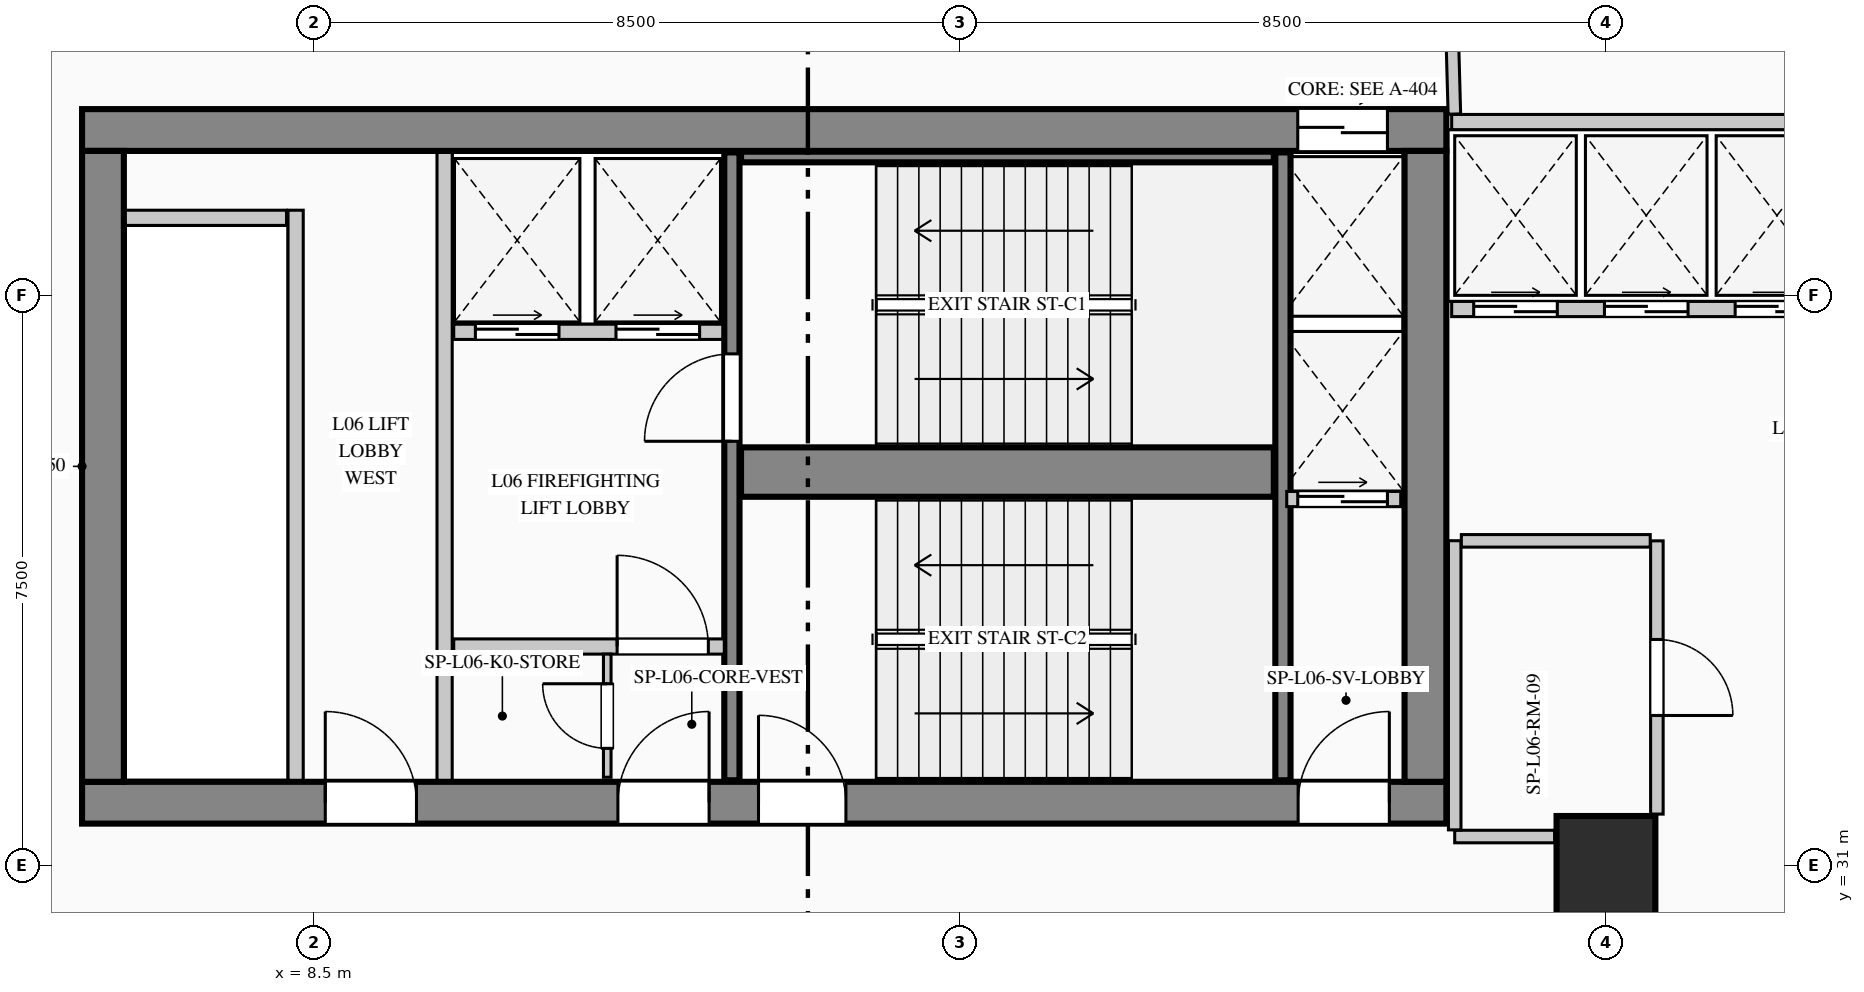
"""IFC4 building model, lengths in metres.
Left out: names, types, materials, properties, quantities, classifications, styles, units other than length and angle.
Written with IfcOpenShell. Run it as: python <this file> out.ifc"""

import sys

from ifc_helpers import new_model, si_unit, direction, frame, frame_2d, origin, origin_2d, place, context, subcontext, project, spatial, rectangle, extrude, element, fill, save


model = new_model("IFC4")
c1 = context("Model", 3, precision=1e-05, world=origin(), true_north=direction((0.0, 1.0)))
c2 = subcontext(c1, "Body", "Model", "MODEL_VIEW")
j1 = project(units=[si_unit("LENGTHUNIT", "METRE"), si_unit("PLANEANGLEUNIT", "RADIAN")], contexts=[c1])
p1 = place(None, origin())
s1 = spatial("IfcSite", under=j1, at=p1, CompositionType="ELEMENT")
p2 = place(p1, origin())
s2 = spatial("IfcBuilding", under=s1, at=p2, CompositionType="ELEMENT")
p3 = place(p2, frame((0.0, 0.0, 27.0)))
s3 = spatial("IfcBuildingStorey", under=s2, at=p3, CompositionType="ELEMENT", Elevation=27.0)
p4 = place(p3, frame((5.45, 40.675, 0.0), z_axis=(0.0, 0.0, 1.0), x_axis=(1.0, 0.0, 0.0)))
e1 = element("IfcWall", 1, at=p4, inside=s3, PredefinedType="SHEAR", context=c2, shape_type="SweptSolid", body=[
    extrude(rectangle(XDim=17.95, YDim=0.55, at=frame_2d((8.975, 0.0))), origin(), (0.0, 0.0, 1.0), 4.4),
])
p5 = place(p4, frame((15.995, 0.0, 0.0)))
e2 = element("IfcOpeningElement", 2, at=p5, cuts=e1, PredefinedType="OPENING", context=c2, shape_type="SweptSolid", body=[
    extrude(rectangle(XDim=1.18, YDim=2.25, at=frame_2d((0.59, 1.125))), frame((0.0, 0.285, 0.0), z_axis=(0.0, -1.0, 0.0), x_axis=(1.0, 0.0, 0.0)), (0.0, 0.0, 1.0), 0.57),
])
p6 = place(p3, frame((5.45, 31.825, 0.0), z_axis=(0.0, 0.0, 1.0), x_axis=(1.0, 0.0, 0.0)))
e3 = element("IfcWall", 3, at=p6, inside=s3, PredefinedType="SHEAR", context=c2, shape_type="SweptSolid", body=[
    extrude(rectangle(XDim=17.95, YDim=0.55, at=frame_2d((8.975, 0.0))), origin(), (0.0, 0.0, 1.0), 4.4),
])
p7 = place(p6, frame((3.2, 0.0, 0.0)))
e4 = element("IfcOpeningElement", 4, at=p7, cuts=e3, PredefinedType="OPENING", context=c2, shape_type="SweptSolid", body=[
    extrude(rectangle(XDim=1.2, YDim=2.2, at=frame_2d((0.6, 1.1))), frame((0.0, 0.285, 0.0), z_axis=(0.0, -1.0, 0.0), x_axis=(1.0, 0.0, 0.0)), (0.0, 0.0, 1.0), 0.57),
])
p8 = place(p6, frame((7.05, 0.0, 0.0)))
e5 = element("IfcOpeningElement", 5, at=p8, cuts=e3, PredefinedType="OPENING", context=c2, shape_type="SweptSolid", body=[
    extrude(rectangle(XDim=1.2, YDim=2.2, at=frame_2d((0.6, 1.1))), frame((0.0, 0.285, 0.0), z_axis=(0.0, -1.0, 0.0), x_axis=(1.0, 0.0, 0.0)), (0.0, 0.0, 1.0), 0.57),
])
p9 = place(p6, frame((8.9, 0.0, 0.0)))
e6 = element("IfcOpeningElement", 6, at=p9, cuts=e3, PredefinedType="OPENING", context=c2, shape_type="SweptSolid", body=[
    extrude(rectangle(XDim=1.15, YDim=2.2, at=frame_2d((0.575, 1.1))), frame((0.0, 0.285, 0.0), z_axis=(0.0, -1.0, 0.0), x_axis=(1.0, 0.0, 0.0)), (0.0, 0.0, 1.0), 0.57),
])
p10 = place(p6, frame((16.0, 0.0, 0.0)))
e7 = element("IfcOpeningElement", 7, at=p10, cuts=e3, PredefinedType="OPENING", context=c2, shape_type="SweptSolid", body=[
    extrude(rectangle(XDim=1.2, YDim=2.2, at=frame_2d((0.6, 1.1))), frame((0.0, 0.285, 0.0), z_axis=(0.0, -1.0, 0.0), x_axis=(1.0, 0.0, 0.0)), (0.0, 0.0, 1.0), 0.57),
])
for number, where, z_axis, x_axis in (
    (8, (5.725, 32.1, 0.0), (0.0, 0.0, 1.0), (0.0, 1.0, 0.0)),
    (9, (23.125, 32.1, 0.0), (0.0, 0.0, 1.0), (0.0, 1.0, 0.0)),
):
    element("IfcWall", number, at=place(p3, frame(where, z_axis=z_axis, x_axis=x_axis)), inside=s3, PredefinedType="SHEAR", context=c2, shape_type="SweptSolid", body=[
        extrude(rectangle(XDim=8.3, YDim=0.55, at=frame_2d((4.15, 0.0))), origin(), (0.0, 0.0, 1.0), 4.4),
    ])
p11 = place(p3, frame((14.0, 32.12, 0.0), z_axis=(0.0, 0.0, 1.0), x_axis=(0.0, 1.0, 0.0)))
e10 = element("IfcWall", 10, at=p11, inside=s3, PredefinedType="SHEAR", context=c2, shape_type="SweptSolid", body=[
    extrude(rectangle(XDim=8.26, YDim=0.2, at=frame_2d((4.13, 0.0))), origin(), (0.0, 0.0, 1.0), 4.4),
])
p12 = place(p11, frame((4.46, 0.0, 0.0)))
e11 = element("IfcOpeningElement", 11, at=p12, cuts=e10, PredefinedType="OPENING", context=c2, shape_type="SweptSolid", body=[
    extrude(rectangle(XDim=1.15, YDim=2.2, at=frame_2d((0.575, 1.1))), frame((0.0, 0.11, 0.0), z_axis=(0.0, -1.0, 0.0), x_axis=(1.0, 0.0, 0.0)), (0.0, 0.0, 1.0), 0.22),
])
p13 = place(p3, frame((14.12, 36.175, 0.0), z_axis=(0.0, 0.0, 1.0), x_axis=(1.0, 0.0, 0.0)))
e12 = element("IfcWall", 12, at=p13, inside=s3, PredefinedType="SHEAR", context=c2, shape_type="SweptSolid", body=[
    extrude(rectangle(XDim=7.01, YDim=0.65, at=frame_2d((3.505, 0.0))), origin(), (0.0, 0.0, 1.0), 4.4),
])
p14 = place(p3, frame((21.25, 32.12, 0.0), z_axis=(0.0, 0.0, 1.0), x_axis=(0.0, 1.0, 0.0)))
e13 = element("IfcWall", 13, at=p14, inside=s3, PredefinedType="SHEAR", context=c2, shape_type="SweptSolid", body=[
    extrude(rectangle(XDim=8.26, YDim=0.2, at=frame_2d((4.13, 0.0))), origin(), (0.0, 0.0, 1.0), 4.4),
])
p15 = place(p3, frame((14.12, 40.32, 0.0), z_axis=(0.0, 0.0, 1.0), x_axis=(1.0, 0.0, 0.0)))
e14 = element("IfcWall", 14, at=p15, inside=s3, PredefinedType="SHEAR", context=c2, shape_type="SweptSolid", body=[
    extrude(rectangle(XDim=7.01, YDim=0.14, at=frame_2d((3.505, 0.0))), origin(), (0.0, 0.0, 1.0), 4.4),
])
p16 = place(p3, frame((25.5, 31.0, 0.0), z_axis=(0.0, 0.0, 1.0), x_axis=(1.0, 0.0, 0.0)))
e15 = element("IfcColumn", 15, at=p16, inside=s3, PredefinedType="COLUMN", context=c2, shape_type="SweptSolid", body=[
    extrude(rectangle(XDim=1.3, YDim=1.3, at=origin_2d()), origin(), (0.0, 0.0, 1.0), 4.4),
])
p17 = place(p3, frame((8.523, 4.84, 0.0), z_axis=(0.0, 0.0, 1.0), x_axis=(-0.150394554312, 0.988626055712, 0.0)))
e16 = element("IfcWall", 16, at=p17, inside=s3, PredefinedType="STANDARD", context=c2, shape_type="SweptSolid", body=[
    extrude(rectangle(XDim=36.738, YDim=0.28, at=frame_2d((18.369, 0.0))), origin(), (0.0, 0.0, 1.0), 4.1),
])
p18 = place(p17, frame((22.762, 0.0, 0.9)))
e17 = element("IfcOpeningElement", 17, at=p18, cuts=e16, PredefinedType="OPENING", context=c2, shape_type="SweptSolid", body=[
    extrude(rectangle(XDim=1.5, YDim=1.8, at=frame_2d((0.75, 0.9))), frame((0.0, 0.15, 0.0), z_axis=(0.0, -1.0, 0.0), x_axis=(1.0, 0.0, 0.0)), (0.0, 0.0, 1.0), 0.3),
])
p19 = place(p3, frame((8.26, 32.12, 0.0), z_axis=(0.0, 0.0, 1.0), x_axis=(0.0, 1.0, 0.0)))
e18 = element("IfcWall", 18, at=p19, inside=s3, PredefinedType="PARTITIONING", context=c2, shape_type="SweptSolid", body=[
    extrude(rectangle(XDim=7.5, YDim=0.2, at=frame_2d((3.75, 0.0))), origin(), (0.0, 0.0, 1.0), 4.1),
])
p20 = place(p3, frame((6.02, 39.52, 0.0), z_axis=(0.0, 0.0, 1.0), x_axis=(1.0, 0.0, 0.0)))
e19 = element("IfcWall", 19, at=p20, inside=s3, PredefinedType="PARTITIONING", context=c2, shape_type="SweptSolid", body=[
    extrude(rectangle(XDim=2.12, YDim=0.2, at=frame_2d((1.06, 0.0))), origin(), (0.0, 0.0, 1.0), 4.1),
])
p21 = place(p3, frame((10.22, 32.12, 0.0), z_axis=(0.0, 0.0, 1.0), x_axis=(0.0, 1.0, 0.0)))
e20 = element("IfcWall", 20, at=p21, inside=s3, PredefinedType="PARTITIONING", context=c2, shape_type="SweptSolid", body=[
    extrude(rectangle(XDim=8.26, YDim=0.2, at=frame_2d((4.13, 0.0))), origin(), (0.0, 0.0, 1.0), 4.1),
])
p22 = place(p3, frame((10.34, 38.02, 0.0), z_axis=(0.0, 0.0, 1.0), x_axis=(1.0, 0.0, 0.0)))
e21 = element("IfcWall", 21, at=p22, inside=s3, PredefinedType="PARTITIONING", context=c2, shape_type="SweptSolid", body=[
    extrude(rectangle(XDim=3.54, YDim=0.2, at=frame_2d((1.77, 0.0))), origin(), (0.0, 0.0, 1.0), 4.1),
])
p23 = place(p22, frame((0.285, 0.0, 0.0)))
e22 = element("IfcOpeningElement", 22, at=p23, cuts=e21, PredefinedType="OPENING", context=c2, shape_type="SweptSolid", body=[
    extrude(rectangle(XDim=1.1, YDim=2.2, at=frame_2d((0.55, 1.1))), frame((0.0, 0.11, 0.0), z_axis=(0.0, -1.0, 0.0), x_axis=(1.0, 0.0, 0.0)), (0.0, 0.0, 1.0), 0.22),
])
p24 = place(p22, frame((2.135, 0.0, 0.0)))
e23 = element("IfcOpeningElement", 23, at=p24, cuts=e21, PredefinedType="OPENING", context=c2, shape_type="SweptSolid", body=[
    extrude(rectangle(XDim=1.1, YDim=2.2, at=frame_2d((0.55, 1.1))), frame((0.0, 0.11, 0.0), z_axis=(0.0, -1.0, 0.0), x_axis=(1.0, 0.0, 0.0)), (0.0, 0.0, 1.0), 0.22),
])
p25 = place(p3, frame((10.34, 33.88, 0.0), z_axis=(0.0, 0.0, 1.0), x_axis=(1.0, 0.0, 0.0)))
e24 = element("IfcWall", 24, at=p25, inside=s3, PredefinedType="PARTITIONING", context=c2, shape_type="SweptSolid", body=[
    extrude(rectangle(XDim=3.56, YDim=0.2, at=frame_2d((1.78, 0.0))), origin(), (0.0, 0.0, 1.0), 4.1),
])
p26 = place(p25, frame((2.15, 0.0, 0.0)))
e25 = element("IfcOpeningElement", 25, at=p26, cuts=e24, PredefinedType="OPENING", context=c2, shape_type="SweptSolid", body=[
    extrude(rectangle(XDim=1.2, YDim=2.2, at=frame_2d((0.6, 1.1))), frame((0.0, 0.11, 0.0), z_axis=(0.0, -1.0, 0.0), x_axis=(1.0, 0.0, 0.0)), (0.0, 0.0, 1.0), 0.22),
])
p27 = place(p3, frame((12.36, 32.16, 0.0), z_axis=(0.0, 0.0, 1.0), x_axis=(0.0, 1.0, 0.0)))
e26 = element("IfcWall", 26, at=p27, inside=s3, PredefinedType="PARTITIONING", context=c2, shape_type="SweptSolid", body=[
    extrude(rectangle(XDim=1.62, YDim=0.1, at=frame_2d((0.81, 0.0))), origin(), (0.0, 0.0, 1.0), 4.1),
])
p28 = place(p27, frame((0.38, 0.0, 0.0)))
e27 = element("IfcOpeningElement", 27, at=p28, cuts=e26, PredefinedType="OPENING", context=c2, shape_type="SweptSolid", body=[
    extrude(rectangle(XDim=0.85, YDim=2.1, at=frame_2d((0.425, 1.05))), frame((0.0, 0.06, 0.0), z_axis=(0.0, -1.0, 0.0), x_axis=(1.0, 0.0, 0.0)), (0.0, 0.0, 1.0), 0.12),
])
p29 = place(p3, frame((21.3, 35.82, 0.0), z_axis=(0.0, 0.0, 1.0), x_axis=(1.0, 0.0, 0.0)))
e28 = element("IfcWall", 28, at=p29, inside=s3, PredefinedType="PARTITIONING", context=c2, shape_type="SweptSolid", body=[
    extrude(rectangle(XDim=1.5, YDim=0.2, at=frame_2d((0.75, 0.0))), origin(), (0.0, 0.0, 1.0), 4.1),
])
p30 = place(p29, frame((0.145, 0.0, 0.0)))
e29 = element("IfcOpeningElement", 29, at=p30, cuts=e28, PredefinedType="OPENING", context=c2, shape_type="SweptSolid", body=[
    extrude(rectangle(XDim=1.18, YDim=2.25, at=frame_2d((0.59, 1.125))), frame((0.0, 0.11, 0.0), z_axis=(0.0, -1.0, 0.0), x_axis=(1.0, 0.0, 0.0)), (0.0, 0.0, 1.0), 0.22),
])
p31 = place(p3, frame((23.47, 40.78, 0.0), z_axis=(0.0, 0.0, 1.0), x_axis=(1.0, 0.0, 0.0)))
e30 = element("IfcWall", 30, at=p31, inside=s3, PredefinedType="PARTITIONING", context=c2, shape_type="SweptSolid", body=[
    extrude(rectangle(XDim=6.91, YDim=0.2, at=frame_2d((3.455, 0.0))), origin(), (0.0, 0.0, 1.0), 4.1),
])
p32 = place(p3, frame((23.47, 38.32, 0.0), z_axis=(0.0, 0.0, 1.0), x_axis=(1.0, 0.0, 0.0)))
e31 = element("IfcWall", 31, at=p32, inside=s3, PredefinedType="PARTITIONING", context=c2, shape_type="SweptSolid", body=[
    extrude(rectangle(XDim=6.79, YDim=0.2, at=frame_2d((3.395, 0.0))), origin(), (0.0, 0.0, 1.0), 4.1),
])
p33 = place(p32, frame((0.29, 0.0, 0.0)))
e32 = element("IfcOpeningElement", 32, at=p33, cuts=e31, PredefinedType="OPENING", context=c2, shape_type="SweptSolid", body=[
    extrude(rectangle(XDim=1.1, YDim=2.2, at=frame_2d((0.55, 1.1))), frame((0.0, 0.11, 0.0), z_axis=(0.0, -1.0, 0.0), x_axis=(1.0, 0.0, 0.0)), (0.0, 0.0, 1.0), 0.22),
])
p34 = place(p32, frame((2.01, 0.0, 0.0)))
e33 = element("IfcOpeningElement", 33, at=p34, cuts=e31, PredefinedType="OPENING", context=c2, shape_type="SweptSolid", body=[
    extrude(rectangle(XDim=1.1, YDim=2.2, at=frame_2d((0.55, 1.1))), frame((0.0, 0.11, 0.0), z_axis=(0.0, -1.0, 0.0), x_axis=(1.0, 0.0, 0.0)), (0.0, 0.0, 1.0), 0.22),
])
p35 = place(p32, frame((3.73, 0.0, 0.0)))
e34 = element("IfcOpeningElement", 34, at=p35, cuts=e31, PredefinedType="OPENING", context=c2, shape_type="SweptSolid", body=[
    extrude(rectangle(XDim=1.1, YDim=2.2, at=frame_2d((0.55, 1.1))), frame((0.0, 0.11, 0.0), z_axis=(0.0, -1.0, 0.0), x_axis=(1.0, 0.0, 0.0)), (0.0, 0.0, 1.0), 0.22),
])
p36 = place(p32, frame((5.45, 0.0, 0.0)))
e35 = element("IfcOpeningElement", 35, at=p36, cuts=e31, PredefinedType="OPENING", context=c2, shape_type="SweptSolid", body=[
    extrude(rectangle(XDim=1.1, YDim=2.2, at=frame_2d((0.55, 1.1))), frame((0.0, 0.11, 0.0), z_axis=(0.0, -1.0, 0.0), x_axis=(1.0, 0.0, 0.0)), (0.0, 0.0, 1.0), 0.22),
])
p37 = place(p3, frame((26.17, 35.27, 0.0), z_axis=(0.0, 0.0, 1.0), x_axis=(0.0, -1.0, 0.0)))
e36 = element("IfcWall", 36, at=p37, inside=s3, PredefinedType="PARTITIONING", context=c2, shape_type="SweptSolid", body=[
    extrude(rectangle(XDim=3.595, YDim=0.165, at=frame_2d((1.797, 0.0))), origin(), (0.0, 0.0, 1.0), 4.1),
])
p38 = place(p37, frame((1.298, 0.0, 0.0)))
e37 = element("IfcOpeningElement", 37, at=p38, cuts=e36, PredefinedType="OPENING", context=c2, shape_type="SweptSolid", body=[
    extrude(rectangle(XDim=1.0, YDim=2.15, at=frame_2d((0.5, 1.075))), frame((0.0, 0.093, 0.0), z_axis=(0.0, -1.0, 0.0), x_axis=(1.0, 0.0, 0.0)), (0.0, 0.0, 1.0), 0.185),
])
p39 = place(p3, frame((24.825, 31.38, 0.0), z_axis=(0.0, 0.0, 1.0), x_axis=(-1.0, 0.0, 0.0)))
e38 = element("IfcWall", 38, at=p39, inside=s3, PredefinedType="PARTITIONING", context=c2, shape_type="SweptSolid", body=[
    extrude(rectangle(XDim=1.315, YDim=0.165, at=frame_2d((0.657, 0.0))), origin(), (0.0, 0.0, 1.0), 4.1),
])
p40 = place(p3, frame((23.51, 31.468, 0.0), z_axis=(0.0, 0.0, 1.0), x_axis=(0.0, 1.0, 0.0)))
e39 = element("IfcWall", 39, at=p40, inside=s3, PredefinedType="PARTITIONING", context=c2, shape_type="SweptSolid", body=[
    extrude(rectangle(XDim=3.804, YDim=0.165, at=frame_2d((1.902, 0.0))), origin(), (0.0, 0.0, 1.0), 4.1),
])
p41 = place(p3, frame((23.597, 35.27, 0.0), z_axis=(0.0, 0.0, 1.0), x_axis=(1.0, 0.0, 0.0)))
e40 = element("IfcWall", 40, at=p41, inside=s3, PredefinedType="PARTITIONING", context=c2, shape_type="SweptSolid", body=[
    extrude(rectangle(XDim=2.485, YDim=0.165, at=frame_2d((1.243, 0.0))), origin(), (0.0, 0.0, 1.0), 4.1),
])
p42 = place(p3, frame((23.506, 40.885, 0.0), z_axis=(0.0, 0.0, 1.0), x_axis=(-0.027441464163, 0.999623412113, 0.0)))
e41 = element("IfcWall", 41, at=p42, inside=s3, PredefinedType="PARTITIONING", context=c2, shape_type="SweptSolid", body=[
    extrude(rectangle(XDim=2.331, YDim=0.165, at=frame_2d((1.166, 0.0))), origin(), (0.0, 0.0, 1.0), 4.1),
])
p43 = place(p7, origin())
e42 = element("IfcDoor", 42, at=p43, inside=s3, OperationType="SINGLE_SWING_LEFT", PredefinedType="DOOR", context=c2, shape_type="SweptSolid", body=[
    extrude(rectangle(XDim=1.2, YDim=2.2, at=frame_2d((0.6, 1.1))), frame((0.0, 0.025, 0.0), z_axis=(0.0, -1.0, 0.0), x_axis=(1.0, 0.0, 0.0)), (0.0, 0.0, 1.0), 0.05),
])
fill(e4, e42)
p44 = place(p8, origin())
e43 = element("IfcDoor", 43, at=p44, inside=s3, OperationType="SINGLE_SWING_RIGHT", PredefinedType="DOOR", context=c2, shape_type="SweptSolid", body=[
    extrude(rectangle(XDim=1.2, YDim=2.2, at=frame_2d((0.6, 1.1))), frame((0.0, 0.025, 0.0), z_axis=(0.0, -1.0, 0.0), x_axis=(1.0, 0.0, 0.0)), (0.0, 0.0, 1.0), 0.05),
])
fill(e5, e43)
p45 = place(p9, origin())
e44 = element("IfcDoor", 44, at=p45, inside=s3, OperationType="SINGLE_SWING_LEFT", PredefinedType="DOOR", context=c2, shape_type="SweptSolid", body=[
    extrude(rectangle(XDim=1.15, YDim=2.2, at=frame_2d((0.575, 1.1))), frame((0.0, 0.025, 0.0), z_axis=(0.0, -1.0, 0.0), x_axis=(1.0, 0.0, 0.0)), (0.0, 0.0, 1.0), 0.05),
])
fill(e6, e44)
p46 = place(p10, origin())
e45 = element("IfcDoor", 45, at=p46, inside=s3, OperationType="SINGLE_SWING_RIGHT", PredefinedType="DOOR", context=c2, shape_type="SweptSolid", body=[
    extrude(rectangle(XDim=1.2, YDim=2.2, at=frame_2d((0.6, 1.1))), frame((0.0, 0.025, 0.0), z_axis=(0.0, -1.0, 0.0), x_axis=(1.0, 0.0, 0.0)), (0.0, 0.0, 1.0), 0.05),
])
fill(e7, e45)
p47 = place(p26, origin())
e46 = element("IfcDoor", 46, at=p47, inside=s3, OperationType="SINGLE_SWING_LEFT", PredefinedType="DOOR", context=c2, shape_type="SweptSolid", body=[
    extrude(rectangle(XDim=1.2, YDim=2.2, at=frame_2d((0.6, 1.1))), frame((0.0, 0.025, 0.0), z_axis=(0.0, -1.0, 0.0), x_axis=(1.0, 0.0, 0.0)), (0.0, 0.0, 1.0), 0.05),
])
fill(e25, e46)
p48 = place(p28, origin())
e47 = element("IfcDoor", 47, at=p48, inside=s3, OperationType="SINGLE_SWING_RIGHT", PredefinedType="DOOR", context=c2, shape_type="SweptSolid", body=[
    extrude(rectangle(XDim=0.85, YDim=2.1, at=frame_2d((0.425, 1.05))), frame((0.0, 0.025, 0.0), z_axis=(0.0, -1.0, 0.0), x_axis=(1.0, 0.0, 0.0)), (0.0, 0.0, 1.0), 0.05),
])
fill(e27, e47)
p49 = place(p12, origin())
e48 = element("IfcDoor", 48, at=p49, inside=s3, OperationType="SINGLE_SWING_LEFT", PredefinedType="DOOR", context=c2, shape_type="SweptSolid", body=[
    extrude(rectangle(XDim=1.15, YDim=2.2, at=frame_2d((0.575, 1.1))), frame((0.0, 0.025, 0.0), z_axis=(0.0, -1.0, 0.0), x_axis=(1.0, 0.0, 0.0)), (0.0, 0.0, 1.0), 0.05),
])
fill(e11, e48)
p50 = place(p23, origin())
e49 = element("IfcDoor", 49, at=p50, inside=s3, OperationType="DOUBLE_DOOR_SLIDING", PredefinedType="DOOR", context=c2, shape_type="SweptSolid", body=[
    extrude(rectangle(XDim=1.1, YDim=2.2, at=frame_2d((0.55, 1.1))), frame((0.0, 0.025, 0.0), z_axis=(0.0, -1.0, 0.0), x_axis=(1.0, 0.0, 0.0)), (0.0, 0.0, 1.0), 0.05),
])
fill(e22, e49)
p51 = place(p24, origin())
e50 = element("IfcDoor", 50, at=p51, inside=s3, OperationType="DOUBLE_DOOR_SLIDING", PredefinedType="DOOR", context=c2, shape_type="SweptSolid", body=[
    extrude(rectangle(XDim=1.1, YDim=2.2, at=frame_2d((0.55, 1.1))), frame((0.0, 0.025, 0.0), z_axis=(0.0, -1.0, 0.0), x_axis=(1.0, 0.0, 0.0)), (0.0, 0.0, 1.0), 0.05),
])
fill(e23, e50)
p52 = place(p5, origin())
e51 = element("IfcDoor", 51, at=p52, inside=s3, OperationType="DOUBLE_DOOR_SLIDING", PredefinedType="DOOR", context=c2, shape_type="SweptSolid", body=[
    extrude(rectangle(XDim=1.18, YDim=2.25, at=frame_2d((0.59, 1.125))), frame((0.0, 0.025, 0.0), z_axis=(0.0, -1.0, 0.0), x_axis=(1.0, 0.0, 0.0)), (0.0, 0.0, 1.0), 0.05),
])
fill(e2, e51)
p53 = place(p30, origin())
e52 = element("IfcDoor", 52, at=p53, inside=s3, OperationType="DOUBLE_DOOR_SLIDING", PredefinedType="DOOR", context=c2, shape_type="SweptSolid", body=[
    extrude(rectangle(XDim=1.18, YDim=2.25, at=frame_2d((0.59, 1.125))), frame((0.0, 0.025, 0.0), z_axis=(0.0, -1.0, 0.0), x_axis=(1.0, 0.0, 0.0)), (0.0, 0.0, 1.0), 0.05),
])
fill(e29, e52)
p54 = place(p33, origin())
e53 = element("IfcDoor", 53, at=p54, inside=s3, OperationType="DOUBLE_DOOR_SLIDING", PredefinedType="DOOR", context=c2, shape_type="SweptSolid", body=[
    extrude(rectangle(XDim=1.1, YDim=2.2, at=frame_2d((0.55, 1.1))), frame((0.0, 0.025, 0.0), z_axis=(0.0, -1.0, 0.0), x_axis=(1.0, 0.0, 0.0)), (0.0, 0.0, 1.0), 0.05),
])
fill(e32, e53)
p55 = place(p34, origin())
e54 = element("IfcDoor", 54, at=p55, inside=s3, OperationType="DOUBLE_DOOR_SLIDING", PredefinedType="DOOR", context=c2, shape_type="SweptSolid", body=[
    extrude(rectangle(XDim=1.1, YDim=2.2, at=frame_2d((0.55, 1.1))), frame((0.0, 0.025, 0.0), z_axis=(0.0, -1.0, 0.0), x_axis=(1.0, 0.0, 0.0)), (0.0, 0.0, 1.0), 0.05),
])
fill(e33, e54)
p56 = place(p35, origin())
e55 = element("IfcDoor", 55, at=p56, inside=s3, OperationType="DOUBLE_DOOR_SLIDING", PredefinedType="DOOR", context=c2, shape_type="SweptSolid", body=[
    extrude(rectangle(XDim=1.1, YDim=2.2, at=frame_2d((0.55, 1.1))), frame((0.0, 0.025, 0.0), z_axis=(0.0, -1.0, 0.0), x_axis=(1.0, 0.0, 0.0)), (0.0, 0.0, 1.0), 0.05),
])
fill(e34, e55)
p57 = place(p38, origin())
e56 = element("IfcDoor", 56, at=p57, inside=s3, OperationType="SINGLE_SWING_RIGHT", PredefinedType="DOOR", context=c2, shape_type="SweptSolid", body=[
    extrude(rectangle(XDim=1.0, YDim=2.15, at=frame_2d((0.5, 1.075))), frame((0.0, 0.025, 0.0), z_axis=(0.0, -1.0, 0.0), x_axis=(1.0, 0.0, 0.0)), (0.0, 0.0, 1.0), 0.05),
])
fill(e37, e56)
save(model, sys.argv[1])
